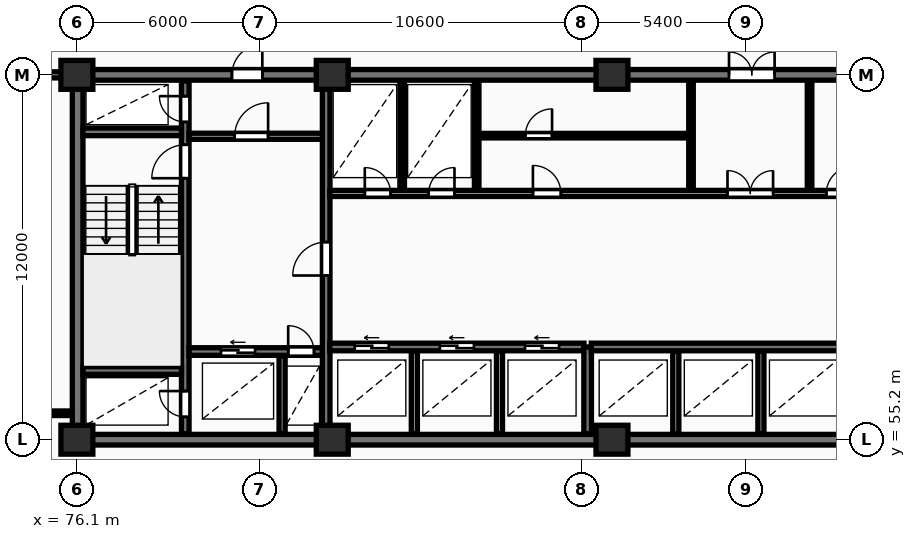
"""IFC4 building model, lengths in metres.
Left out: names, types, materials, properties, quantities, classifications, styles, units other than length and angle.
Written with IfcOpenShell. Run it as: python <this file> out.ifc"""

import sys

from ifc_helpers import new_model, si_unit, direction, frame, frame_2d, origin, origin_2d, place, context, subcontext, project, spatial, rectangle, extrude, element, fill, save


model = new_model("IFC4")
c1 = context("Model", 3, precision=1e-05, world=origin(), true_north=direction((0.0, 1.0)))
c2 = subcontext(c1, "Body", "Model", "MODEL_VIEW")
j1 = project(units=[si_unit("LENGTHUNIT", "METRE"), si_unit("PLANEANGLEUNIT", "RADIAN")], contexts=[c1])
p1 = place(None, origin())
s1 = spatial("IfcSite", under=j1, at=p1, CompositionType="ELEMENT")
p2 = place(p1, origin())
s2 = spatial("IfcBuilding", under=s1, at=p2, CompositionType="ELEMENT")
p3 = place(p2, frame((0.0, 0.0, 24.0)))
s3 = spatial("IfcBuildingStorey", under=s2, at=p3, CompositionType="ELEMENT", Elevation=24.0)
for number, where, z_axis, x_axis in (
    (1, (76.1, 55.2, 0.0), (0.0, 0.0, 1.0), (1.0, 0.0, 0.0)),
    (2, (76.1, 67.2, 0.0), (0.0, 0.0, 1.0), (1.0, 0.0, 0.0)),
    (3, (84.5, 55.2, 0.0), (0.0, 0.0, 1.0), (1.0, 0.0, 0.0)),
    (4, (84.5, 67.2, 0.0), (0.0, 0.0, 1.0), (1.0, 0.0, 0.0)),
    (5, (93.7, 55.2, 0.0), (0.0, 0.0, 1.0), (1.0, 0.0, 0.0)),
    (6, (93.7, 67.2, 0.0), (0.0, 0.0, 1.0), (1.0, 0.0, 0.0)),
):
    element("IfcColumn", number, at=place(p3, frame(where, z_axis=z_axis, x_axis=x_axis)), inside=s3, PredefinedType="COLUMN", context=c2, shape_type="SweptSolid", body=[
        extrude(rectangle(XDim=1.05, YDim=0.95, at=origin_2d()), origin(), (0.0, 0.0, 1.0), 3.25),
    ])
p4 = place(p3, frame((75.95, 55.2, 0.0), z_axis=(0.0, 0.0, 1.0), x_axis=(1.0, 0.0, 0.0)))
e7 = element("IfcWall", 7, at=p4, inside=s3, PredefinedType="SHEAR", context=c2, shape_type="SweptSolid", body=[
    extrude(rectangle(XDim=36.3, YDim=0.35, at=frame_2d((18.15, 0.0))), origin(), (0.0, 0.0, 1.0), 3.25),
])
p5 = place(p3, frame((76.125, 55.375, 0.0), z_axis=(0.0, 0.0, 1.0), x_axis=(0.0, 1.0, 0.0)))
e8 = element("IfcWall", 8, at=p5, inside=s3, PredefinedType="SHEAR", context=c2, shape_type="SweptSolid", body=[
    extrude(rectangle(XDim=11.65, YDim=0.35, at=frame_2d((5.825, 0.0))), origin(), (0.0, 0.0, 1.0), 3.25),
])
p6 = place(p3, frame((75.95, 67.2, 0.0), z_axis=(0.0, 0.0, 1.0), x_axis=(1.0, 0.0, 0.0)))
e9 = element("IfcWall", 9, at=p6, inside=s3, PredefinedType="SHEAR", context=c2, shape_type="SweptSolid", body=[
    extrude(rectangle(XDim=36.3, YDim=0.35, at=frame_2d((18.15, 0.0))), origin(), (0.0, 0.0, 1.0), 3.25),
])
p7 = place(p6, frame((5.25, 0.0, 0.0)))
e10 = element("IfcOpeningElement", 10, at=p7, cuts=e9, PredefinedType="OPENING", context=c2, shape_type="SweptSolid", body=[
    extrude(rectangle(XDim=1.0, YDim=2.15, at=frame_2d((0.5, 1.075))), frame((0.0, 0.185, 0.0), z_axis=(0.0, -1.0, 0.0), x_axis=(1.0, 0.0, 0.0)), (0.0, 0.0, 1.0), 0.37),
])
p8 = place(p6, frame((21.6, 0.0, 0.0)))
e11 = element("IfcOpeningElement", 11, at=p8, cuts=e9, PredefinedType="OPENING", context=c2, shape_type="SweptSolid", body=[
    extrude(rectangle(XDim=1.5, YDim=2.2, at=frame_2d((0.75, 1.1))), frame((0.0, 0.185, 0.0), z_axis=(0.0, -1.0, 0.0), x_axis=(1.0, 0.0, 0.0)), (0.0, 0.0, 1.0), 0.37),
])
p9 = place(p6, frame((30.45, 0.0, 0.0)))
e12 = element("IfcOpeningElement", 12, at=p9, cuts=e9, PredefinedType="OPENING", context=c2, shape_type="SweptSolid", body=[
    extrude(rectangle(XDim=1.0, YDim=2.15, at=frame_2d((0.5, 1.075))), frame((0.0, 0.185, 0.0), z_axis=(0.0, -1.0, 0.0), x_axis=(1.0, 0.0, 0.0)), (0.0, 0.0, 1.0), 0.37),
])
p10 = place(p3, frame((79.665, 55.4, 0.0), z_axis=(0.0, 0.0, 1.0), x_axis=(0.0, 1.0, 0.0)))
e13 = element("IfcWall", 13, at=p10, inside=s3, PredefinedType="SHEAR", context=c2, shape_type="SweptSolid", body=[
    extrude(rectangle(XDim=11.6, YDim=0.25, at=frame_2d((5.8, 0.0))), origin(), (0.0, 0.0, 1.0), 3.25),
])
p11 = place(p10, frame((0.55, 0.0, 0.0)))
e14 = element("IfcOpeningElement", 14, at=p11, cuts=e13, PredefinedType="OPENING", context=c2, shape_type="SweptSolid", body=[
    extrude(rectangle(XDim=0.85, YDim=2.05, at=frame_2d((0.425, 1.025))), frame((0.0, 0.135, 0.0), z_axis=(0.0, -1.0, 0.0), x_axis=(1.0, 0.0, 0.0)), (0.0, 0.0, 1.0), 0.27),
])
p12 = place(p10, frame((8.4, 0.0, 0.0)))
e15 = element("IfcOpeningElement", 15, at=p12, cuts=e13, PredefinedType="OPENING", context=c2, shape_type="SweptSolid", body=[
    extrude(rectangle(XDim=1.1, YDim=2.1, at=frame_2d((0.55, 1.05))), frame((0.0, 0.135, 0.0), z_axis=(0.0, -1.0, 0.0), x_axis=(1.0, 0.0, 0.0)), (0.0, 0.0, 1.0), 0.27),
])
p13 = place(p10, frame((10.25, 0.0, 0.0)))
e16 = element("IfcOpeningElement", 16, at=p13, cuts=e13, PredefinedType="OPENING", context=c2, shape_type="SweptSolid", body=[
    extrude(rectangle(XDim=0.85, YDim=2.05, at=frame_2d((0.425, 1.025))), frame((0.0, 0.135, 0.0), z_axis=(0.0, -1.0, 0.0), x_axis=(1.0, 0.0, 0.0)), (0.0, 0.0, 1.0), 0.27),
])
for number, where, z_axis, x_axis in (
    (17, (76.3, 57.475, 0.0), (0.0, 0.0, 1.0), (1.0, 0.0, 0.0)),
    (18, (76.3, 65.325, 0.0), (0.0, 0.0, 1.0), (1.0, 0.0, 0.0)),
):
    element("IfcWall", number, at=place(p3, frame(where, z_axis=z_axis, x_axis=x_axis)), inside=s3, PredefinedType="SHEAR", context=c2, shape_type="SweptSolid", body=[
        extrude(rectangle(XDim=3.24, YDim=0.25, at=frame_2d((1.62, 0.0))), origin(), (0.0, 0.0, 1.0), 3.25),
    ])
p14 = place(p3, frame((79.79, 58.1, 0.0), z_axis=(0.0, 0.0, 1.0), x_axis=(1.0, 0.0, 0.0)))
e19 = element("IfcWall", 19, at=p14, inside=s3, PredefinedType="SHEAR", context=c2, shape_type="SweptSolid", body=[
    extrude(rectangle(XDim=4.39, YDim=0.25, at=frame_2d((2.195, 0.0))), origin(), (0.0, 0.0, 1.0), 3.25),
])
p15 = place(p14, frame((1.05, 0.0, 0.0)))
e20 = element("IfcOpeningElement", 20, at=p15, cuts=e19, PredefinedType="OPENING", context=c2, shape_type="SweptSolid", body=[
    extrude(rectangle(XDim=1.12, YDim=2.12, at=frame_2d((0.56, 1.06))), frame((0.0, 0.135, 0.0), z_axis=(0.0, -1.0, 0.0), x_axis=(1.0, 0.0, 0.0)), (0.0, 0.0, 1.0), 0.27),
])
p16 = place(p14, frame((3.26, 0.0, 0.0)))
e21 = element("IfcOpeningElement", 21, at=p16, cuts=e19, PredefinedType="OPENING", context=c2, shape_type="SweptSolid", body=[
    extrude(rectangle(XDim=0.85, YDim=2.05, at=frame_2d((0.425, 1.025))), frame((0.0, 0.135, 0.0), z_axis=(0.0, -1.0, 0.0), x_axis=(1.0, 0.0, 0.0)), (0.0, 0.0, 1.0), 0.27),
])
p17 = place(p3, frame((82.85, 55.4, 0.0), z_axis=(0.0, 0.0, 1.0), x_axis=(0.0, 1.0, 0.0)))
e22 = element("IfcWall", 22, at=p17, inside=s3, PredefinedType="PARTITIONING", context=c2, shape_type="SweptSolid", body=[
    extrude(rectangle(XDim=2.56, YDim=0.2, at=frame_2d((1.28, 0.0))), origin(), (0.0, 0.0, 1.0), 2.97),
])
p18 = place(p3, frame((79.79, 65.18, 0.0), z_axis=(0.0, 0.0, 1.0), x_axis=(1.0, 0.0, 0.0)))
e23 = element("IfcWall", 23, at=p18, inside=s3, PredefinedType="PARTITIONING", context=c2, shape_type="SweptSolid", body=[
    extrude(rectangle(XDim=4.39, YDim=0.2, at=frame_2d((2.195, 0.0))), origin(), (0.0, 0.0, 1.0), 2.97),
])
p19 = place(p18, frame((1.5, 0.0, 0.0)))
e24 = element("IfcOpeningElement", 24, at=p19, cuts=e23, PredefinedType="OPENING", context=c2, shape_type="SweptSolid", body=[
    extrude(rectangle(XDim=1.1, YDim=2.1, at=frame_2d((0.55, 1.05))), frame((0.0, 0.11, 0.0), z_axis=(0.0, -1.0, 0.0), x_axis=(1.0, 0.0, 0.0)), (0.0, 0.0, 1.0), 0.22),
])
p20 = place(p3, frame((84.3, 55.4, 0.0), z_axis=(0.0, 0.0, 1.0), x_axis=(0.0, 1.0, 0.0)))
e25 = element("IfcWall", 25, at=p20, inside=s3, PredefinedType="SHEAR", context=c2, shape_type="SweptSolid", body=[
    extrude(rectangle(XDim=11.6, YDim=0.25, at=frame_2d((5.8, 0.0))), origin(), (0.0, 0.0, 1.0), 3.25),
])
p21 = place(p20, frame((5.2, 0.0, 0.0)))
e26 = element("IfcOpeningElement", 26, at=p21, cuts=e25, PredefinedType="OPENING", context=c2, shape_type="SweptSolid", body=[
    extrude(rectangle(XDim=1.1, YDim=2.1, at=frame_2d((0.55, 1.05))), frame((0.0, 0.135, 0.0), z_axis=(0.0, -1.0, 0.0), x_axis=(1.0, 0.0, 0.0)), (0.0, 0.0, 1.0), 0.27),
])
for number, where, z_axis, x_axis in (
    (27, (87.2, 55.4, 0.0), (0.0, 0.0, 1.0), (0.0, 1.0, 0.0)),
    (28, (90.0, 55.4, 0.0), (0.0, 0.0, 1.0), (0.0, 1.0, 0.0)),
):
    element("IfcWall", number, at=place(p3, frame(where, z_axis=z_axis, x_axis=x_axis)), inside=s3, PredefinedType="PARTITIONING", context=c2, shape_type="SweptSolid", body=[
        extrude(rectangle(XDim=2.72, YDim=0.2, at=frame_2d((1.36, 0.0))), origin(), (0.0, 0.0, 1.0), 2.97),
    ])
p22 = place(p3, frame((84.42, 58.25, 0.0), z_axis=(0.0, 0.0, 1.0), x_axis=(1.0, 0.0, 0.0)))
e29 = element("IfcWall", 29, at=p22, inside=s3, PredefinedType="SHEAR", context=c2, shape_type="SweptSolid", body=[
    extrude(rectangle(XDim=8.36, YDim=0.25, at=frame_2d((4.18, 0.0))), origin(), (0.0, 0.0, 1.0), 3.25),
])
p23 = place(p22, frame((0.82, 0.0, 0.0)))
e30 = element("IfcOpeningElement", 30, at=p23, cuts=e29, PredefinedType="OPENING", context=c2, shape_type="SweptSolid", body=[
    extrude(rectangle(XDim=1.12, YDim=2.12, at=frame_2d((0.56, 1.06))), frame((0.0, 0.135, 0.0), z_axis=(0.0, -1.0, 0.0), x_axis=(1.0, 0.0, 0.0)), (0.0, 0.0, 1.0), 0.27),
])
p24 = place(p22, frame((3.62, 0.0, 0.0)))
e31 = element("IfcOpeningElement", 31, at=p24, cuts=e29, PredefinedType="OPENING", context=c2, shape_type="SweptSolid", body=[
    extrude(rectangle(XDim=1.12, YDim=2.12, at=frame_2d((0.56, 1.06))), frame((0.0, 0.135, 0.0), z_axis=(0.0, -1.0, 0.0), x_axis=(1.0, 0.0, 0.0)), (0.0, 0.0, 1.0), 0.27),
])
p25 = place(p22, frame((6.42, 0.0, 0.0)))
e32 = element("IfcOpeningElement", 32, at=p25, cuts=e29, PredefinedType="OPENING", context=c2, shape_type="SweptSolid", body=[
    extrude(rectangle(XDim=1.12, YDim=2.12, at=frame_2d((0.56, 1.06))), frame((0.0, 0.135, 0.0), z_axis=(0.0, -1.0, 0.0), x_axis=(1.0, 0.0, 0.0)), (0.0, 0.0, 1.0), 0.27),
])
p26 = place(p3, frame((92.9, 55.4, 0.0), z_axis=(0.0, 0.0, 1.0), x_axis=(0.0, 1.0, 0.0)))
e33 = element("IfcWall", 33, at=p26, inside=s3, PredefinedType="SHEAR", context=c2, shape_type="SweptSolid", body=[
    extrude(rectangle(XDim=2.85, YDim=0.25, at=frame_2d((1.425, 0.0))), origin(), (0.0, 0.0, 1.0), 3.25),
])
for number, where, z_axis, x_axis in (
    (34, (95.8, 55.4, 0.0), (0.0, 0.0, 1.0), (0.0, 1.0, 0.0)),
    (35, (98.6, 55.4, 0.0), (0.0, 0.0, 1.0), (0.0, 1.0, 0.0)),
):
    element("IfcWall", number, at=place(p3, frame(where, z_axis=z_axis, x_axis=x_axis)), inside=s3, PredefinedType="PARTITIONING", context=c2, shape_type="SweptSolid", body=[
        extrude(rectangle(XDim=2.72, YDim=0.2, at=frame_2d((1.36, 0.0))), origin(), (0.0, 0.0, 1.0), 2.97),
    ])
p27 = place(p3, frame((93.02, 58.25, 0.0), z_axis=(0.0, 0.0, 1.0), x_axis=(1.0, 0.0, 0.0)))
e36 = element("IfcWall", 36, at=p27, inside=s3, PredefinedType="SHEAR", context=c2, shape_type="SweptSolid", body=[
    extrude(rectangle(XDim=8.36, YDim=0.25, at=frame_2d((4.18, 0.0))), origin(), (0.0, 0.0, 1.0), 3.25),
])
for number, where, z_axis, x_axis in (
    (37, (86.8, 63.4, 0.0), (0.0, 0.0, 1.0), (0.0, 1.0, 0.0)),
    (38, (89.25, 63.4, 0.0), (0.0, 0.0, 1.0), (0.0, 1.0, 0.0)),
):
    element("IfcWall", number, at=place(p3, frame(where, z_axis=z_axis, x_axis=x_axis)), inside=s3, PredefinedType="PARTITIONING", context=c2, shape_type="SweptSolid", body=[
        extrude(rectangle(XDim=3.6, YDim=0.15, at=frame_2d((1.8, 0.0))), origin(), (0.0, 0.0, 1.0), 2.97),
    ])
p28 = place(p3, frame((89.25, 65.2, 0.0), z_axis=(0.0, 0.0, 1.0), x_axis=(1.0, 0.0, 0.0)))
e39 = element("IfcWall", 39, at=p28, inside=s3, PredefinedType="PARTITIONING", context=c2, shape_type="SweptSolid", body=[
    extrude(rectangle(XDim=7.05, YDim=0.15, at=frame_2d((3.525, 0.0))), origin(), (0.0, 0.0, 1.0), 2.97),
])
p29 = place(p28, frame((1.6, 0.0, 0.0)))
e40 = element("IfcOpeningElement", 40, at=p29, cuts=e39, PredefinedType="OPENING", context=c2, shape_type="SweptSolid", body=[
    extrude(rectangle(XDim=0.88, YDim=2.06, at=frame_2d((0.44, 1.03))), frame((0.0, 0.085, 0.0), z_axis=(0.0, -1.0, 0.0), x_axis=(1.0, 0.0, 0.0)), (0.0, 0.0, 1.0), 0.17),
])
for number, where, z_axis, x_axis in (
    (41, (96.3, 63.4, 0.0), (0.0, 0.0, 1.0), (0.0, 1.0, 0.0)),
    (42, (100.2, 63.4, 0.0), (0.0, 0.0, 1.0), (0.0, 1.0, 0.0)),
):
    element("IfcWall", number, at=place(p3, frame(where, z_axis=z_axis, x_axis=x_axis)), inside=s3, PredefinedType="PARTITIONING", context=c2, shape_type="SweptSolid", body=[
        extrude(rectangle(XDim=3.6, YDim=0.15, at=frame_2d((1.8, 0.0))), origin(), (0.0, 0.0, 1.0), 2.97),
    ])
p30 = place(p3, frame((84.42, 63.3, 0.0), z_axis=(0.0, 0.0, 1.0), x_axis=(1.0, 0.0, 0.0)))
e43 = element("IfcWall", 43, at=p30, inside=s3, PredefinedType="PARTITIONING", context=c2, shape_type="SweptSolid", body=[
    extrude(rectangle(XDim=19.83, YDim=0.2, at=frame_2d((9.915, 0.0))), origin(), (0.0, 0.0, 1.0), 2.97),
])
p31 = place(p30, frame((1.15, 0.0, 0.0)))
e44 = element("IfcOpeningElement", 44, at=p31, cuts=e43, PredefinedType="OPENING", context=c2, shape_type="SweptSolid", body=[
    extrude(rectangle(XDim=0.85, YDim=2.05, at=frame_2d((0.425, 1.025))), frame((0.0, 0.11, 0.0), z_axis=(0.0, -1.0, 0.0), x_axis=(1.0, 0.0, 0.0)), (0.0, 0.0, 1.0), 0.22),
])
p32 = place(p30, frame((3.25, 0.0, 0.0)))
e45 = element("IfcOpeningElement", 45, at=p32, cuts=e43, PredefinedType="OPENING", context=c2, shape_type="SweptSolid", body=[
    extrude(rectangle(XDim=0.85, YDim=2.05, at=frame_2d((0.425, 1.025))), frame((0.0, 0.11, 0.0), z_axis=(0.0, -1.0, 0.0), x_axis=(1.0, 0.0, 0.0)), (0.0, 0.0, 1.0), 0.22),
])
p33 = place(p30, frame((13.08, 0.0, 0.0)))
e46 = element("IfcOpeningElement", 46, at=p33, cuts=e43, PredefinedType="OPENING", context=c2, shape_type="SweptSolid", body=[
    extrude(rectangle(XDim=1.5, YDim=2.2, at=frame_2d((0.75, 1.1))), frame((0.0, 0.11, 0.0), z_axis=(0.0, -1.0, 0.0), x_axis=(1.0, 0.0, 0.0)), (0.0, 0.0, 1.0), 0.22),
])
p34 = place(p30, frame((6.68, 0.0, 0.0)))
e47 = element("IfcOpeningElement", 47, at=p34, cuts=e43, PredefinedType="OPENING", context=c2, shape_type="SweptSolid", body=[
    extrude(rectangle(XDim=0.92, YDim=2.08, at=frame_2d((0.46, 1.04))), frame((0.0, 0.11, 0.0), z_axis=(0.0, -1.0, 0.0), x_axis=(1.0, 0.0, 0.0)), (0.0, 0.0, 1.0), 0.22),
])
p35 = place(p30, frame((16.33, 0.0, 0.0)))
e48 = element("IfcOpeningElement", 48, at=p35, cuts=e43, PredefinedType="OPENING", context=c2, shape_type="SweptSolid", body=[
    extrude(rectangle(XDim=0.88, YDim=2.06, at=frame_2d((0.44, 1.03))), frame((0.0, 0.11, 0.0), z_axis=(0.0, -1.0, 0.0), x_axis=(1.0, 0.0, 0.0)), (0.0, 0.0, 1.0), 0.22),
])
p36 = place(p3, frame((69.17, 56.07, 0.0), z_axis=(0.0, 0.0, 1.0), x_axis=(1.0, 0.0, 0.0)))
e49 = element("IfcWall", 49, at=p36, inside=s3, PredefinedType="PARTITIONING", context=c2, shape_type="SweptSolid", body=[
    extrude(rectangle(XDim=6.76, YDim=0.15, at=frame_2d((3.38, 0.0))), origin(), (0.0, 0.0, 1.0), 2.97),
])
p37 = place(p36, frame((1.362, 0.0, 0.0)))
e50 = element("IfcOpeningElement", 50, at=p37, cuts=e49, PredefinedType="OPENING", context=c2, shape_type="SweptSolid", body=[
    extrude(rectangle(XDim=0.84, YDim=2.04, at=frame_2d((0.42, 1.02))), frame((0.0, 0.085, 0.0), z_axis=(0.0, -1.0, 0.0), x_axis=(1.0, 0.0, 0.0)), (0.0, 0.0, 1.0), 0.17),
])
p38 = place(p36, frame((4.277, 0.0, 0.0)))
e51 = element("IfcOpeningElement", 51, at=p38, cuts=e49, PredefinedType="OPENING", context=c2, shape_type="SweptSolid", body=[
    extrude(rectangle(XDim=0.88, YDim=2.06, at=frame_2d((0.44, 1.03))), frame((0.0, 0.085, 0.0), z_axis=(0.0, -1.0, 0.0), x_axis=(1.0, 0.0, 0.0)), (0.0, 0.0, 1.0), 0.17),
])
p39 = place(p3, frame((55.3, 67.2, 0.0), z_axis=(0.0, 0.0, 1.0), x_axis=(1.0, 0.0, 0.0)))
e52 = element("IfcWall", 52, at=p39, inside=s3, PredefinedType="PARTITIONING", context=c2, shape_type="SweptSolid", body=[
    extrude(rectangle(XDim=20.65, YDim=0.2, at=frame_2d((10.325, 0.0))), origin(), (0.0, 0.0, 1.0), 2.37),
])
p40 = place(p39, frame((14.426, 0.0, 0.0)))
e53 = element("IfcOpeningElement", 53, at=p40, cuts=e52, PredefinedType="OPENING", context=c2, shape_type="SweptSolid", body=[
    extrude(rectangle(XDim=0.95, YDim=2.15, at=frame_2d((0.475, 1.075))), frame((0.0, 0.11, 0.0), z_axis=(0.0, -1.0, 0.0), x_axis=(1.0, 0.0, 0.0)), (0.0, 0.0, 1.0), 0.22),
])
p41 = place(p7, origin())
e54 = element("IfcDoor", 54, at=p41, inside=s3, OperationType="SINGLE_SWING_RIGHT", PredefinedType="DOOR", context=c2, shape_type="SweptSolid", body=[
    extrude(rectangle(XDim=1.0, YDim=2.15, at=frame_2d((0.5, 1.075))), frame((0.0, 0.025, 0.0), z_axis=(0.0, -1.0, 0.0), x_axis=(1.0, 0.0, 0.0)), (0.0, 0.0, 1.0), 0.05),
])
fill(e10, e54)
p42 = place(p8, origin())
e55 = element("IfcDoor", 55, at=p42, inside=s3, OperationType="DOUBLE_DOOR_SINGLE_SWING", PredefinedType="DOOR", context=c2, shape_type="SweptSolid", body=[
    extrude(rectangle(XDim=1.5, YDim=2.2, at=frame_2d((0.75, 1.1))), frame((0.0, 0.025, 0.0), z_axis=(0.0, -1.0, 0.0), x_axis=(1.0, 0.0, 0.0)), (0.0, 0.0, 1.0), 0.05),
])
fill(e11, e55)
p43 = place(p11, origin())
e56 = element("IfcDoor", 56, at=p43, inside=s3, OperationType="SINGLE_SWING_RIGHT", PredefinedType="DOOR", context=c2, shape_type="SweptSolid", body=[
    extrude(rectangle(XDim=0.85, YDim=2.05, at=frame_2d((0.425, 1.025))), frame((0.0, 0.025, 0.0), z_axis=(0.0, -1.0, 0.0), x_axis=(1.0, 0.0, 0.0)), (0.0, 0.0, 1.0), 0.05),
])
fill(e14, e56)
p44 = place(p12, origin())
e57 = element("IfcDoor", 57, at=p44, inside=s3, OperationType="SINGLE_SWING_LEFT", PredefinedType="DOOR", context=c2, shape_type="SweptSolid", body=[
    extrude(rectangle(XDim=1.1, YDim=2.1, at=frame_2d((0.55, 1.05))), frame((0.0, 0.025, 0.0), z_axis=(0.0, -1.0, 0.0), x_axis=(1.0, 0.0, 0.0)), (0.0, 0.0, 1.0), 0.05),
])
fill(e15, e57)
p45 = place(p13, origin())
e58 = element("IfcDoor", 58, at=p45, inside=s3, OperationType="SINGLE_SWING_RIGHT", PredefinedType="DOOR", context=c2, shape_type="SweptSolid", body=[
    extrude(rectangle(XDim=0.85, YDim=2.05, at=frame_2d((0.425, 1.025))), frame((0.0, 0.025, 0.0), z_axis=(0.0, -1.0, 0.0), x_axis=(1.0, 0.0, 0.0)), (0.0, 0.0, 1.0), 0.05),
])
fill(e16, e58)
p46 = place(p15, origin())
e59 = element("IfcDoor", 59, at=p46, inside=s3, OperationType="SLIDING_TO_LEFT", PredefinedType="DOOR", context=c2, shape_type="SweptSolid", body=[
    extrude(rectangle(XDim=1.12, YDim=2.12, at=frame_2d((0.56, 1.06))), frame((0.0, 0.025, 0.0), z_axis=(0.0, -1.0, 0.0), x_axis=(1.0, 0.0, 0.0)), (0.0, 0.0, 1.0), 0.05),
])
fill(e20, e59)
p47 = place(p16, origin())
e60 = element("IfcDoor", 60, at=p47, inside=s3, OperationType="SINGLE_SWING_LEFT", PredefinedType="DOOR", context=c2, shape_type="SweptSolid", body=[
    extrude(rectangle(XDim=0.85, YDim=2.05, at=frame_2d((0.425, 1.025))), frame((0.0, 0.025, 0.0), z_axis=(0.0, -1.0, 0.0), x_axis=(1.0, 0.0, 0.0)), (0.0, 0.0, 1.0), 0.05),
])
fill(e21, e60)
p48 = place(p19, origin())
e61 = element("IfcDoor", 61, at=p48, inside=s3, OperationType="SINGLE_SWING_RIGHT", PredefinedType="DOOR", context=c2, shape_type="SweptSolid", body=[
    extrude(rectangle(XDim=1.1, YDim=2.1, at=frame_2d((0.55, 1.05))), frame((0.0, 0.025, 0.0), z_axis=(0.0, -1.0, 0.0), x_axis=(1.0, 0.0, 0.0)), (0.0, 0.0, 1.0), 0.05),
])
fill(e24, e61)
p49 = place(p21, origin())
e62 = element("IfcDoor", 62, at=p49, inside=s3, OperationType="SINGLE_SWING_LEFT", PredefinedType="DOOR", context=c2, shape_type="SweptSolid", body=[
    extrude(rectangle(XDim=1.1, YDim=2.1, at=frame_2d((0.55, 1.05))), frame((0.0, 0.025, 0.0), z_axis=(0.0, -1.0, 0.0), x_axis=(1.0, 0.0, 0.0)), (0.0, 0.0, 1.0), 0.05),
])
fill(e26, e62)
p50 = place(p23, origin())
e63 = element("IfcDoor", 63, at=p50, inside=s3, OperationType="SLIDING_TO_LEFT", PredefinedType="DOOR", context=c2, shape_type="SweptSolid", body=[
    extrude(rectangle(XDim=1.12, YDim=2.12, at=frame_2d((0.56, 1.06))), frame((0.0, 0.025, 0.0), z_axis=(0.0, -1.0, 0.0), x_axis=(1.0, 0.0, 0.0)), (0.0, 0.0, 1.0), 0.05),
])
fill(e30, e63)
p51 = place(p24, origin())
e64 = element("IfcDoor", 64, at=p51, inside=s3, OperationType="SLIDING_TO_LEFT", PredefinedType="DOOR", context=c2, shape_type="SweptSolid", body=[
    extrude(rectangle(XDim=1.12, YDim=2.12, at=frame_2d((0.56, 1.06))), frame((0.0, 0.025, 0.0), z_axis=(0.0, -1.0, 0.0), x_axis=(1.0, 0.0, 0.0)), (0.0, 0.0, 1.0), 0.05),
])
fill(e31, e64)
p52 = place(p25, origin())
e65 = element("IfcDoor", 65, at=p52, inside=s3, OperationType="SLIDING_TO_LEFT", PredefinedType="DOOR", context=c2, shape_type="SweptSolid", body=[
    extrude(rectangle(XDim=1.12, YDim=2.12, at=frame_2d((0.56, 1.06))), frame((0.0, 0.025, 0.0), z_axis=(0.0, -1.0, 0.0), x_axis=(1.0, 0.0, 0.0)), (0.0, 0.0, 1.0), 0.05),
])
fill(e32, e65)
p53 = place(p29, origin())
e66 = element("IfcDoor", 66, at=p53, inside=s3, OperationType="SINGLE_SWING_RIGHT", PredefinedType="DOOR", context=c2, shape_type="SweptSolid", body=[
    extrude(rectangle(XDim=0.88, YDim=2.06, at=frame_2d((0.44, 1.03))), frame((0.0, 0.025, 0.0), z_axis=(0.0, -1.0, 0.0), x_axis=(1.0, 0.0, 0.0)), (0.0, 0.0, 1.0), 0.05),
])
fill(e40, e66)
p54 = place(p31, origin())
e67 = element("IfcDoor", 67, at=p54, inside=s3, OperationType="SINGLE_SWING_LEFT", PredefinedType="DOOR", context=c2, shape_type="SweptSolid", body=[
    extrude(rectangle(XDim=0.85, YDim=2.05, at=frame_2d((0.425, 1.025))), frame((0.0, 0.025, 0.0), z_axis=(0.0, -1.0, 0.0), x_axis=(1.0, 0.0, 0.0)), (0.0, 0.0, 1.0), 0.05),
])
fill(e44, e67)
p55 = place(p32, origin())
e68 = element("IfcDoor", 68, at=p55, inside=s3, OperationType="SINGLE_SWING_RIGHT", PredefinedType="DOOR", context=c2, shape_type="SweptSolid", body=[
    extrude(rectangle(XDim=0.85, YDim=2.05, at=frame_2d((0.425, 1.025))), frame((0.0, 0.025, 0.0), z_axis=(0.0, -1.0, 0.0), x_axis=(1.0, 0.0, 0.0)), (0.0, 0.0, 1.0), 0.05),
])
fill(e45, e68)
p56 = place(p33, origin())
e69 = element("IfcDoor", 69, at=p56, inside=s3, OperationType="DOUBLE_DOOR_SINGLE_SWING", PredefinedType="DOOR", context=c2, shape_type="SweptSolid", body=[
    extrude(rectangle(XDim=1.5, YDim=2.2, at=frame_2d((0.75, 1.1))), frame((0.0, 0.025, 0.0), z_axis=(0.0, -1.0, 0.0), x_axis=(1.0, 0.0, 0.0)), (0.0, 0.0, 1.0), 0.05),
])
fill(e46, e69)
p57 = place(p34, origin())
e70 = element("IfcDoor", 70, at=p57, inside=s3, OperationType="SINGLE_SWING_LEFT", PredefinedType="DOOR", context=c2, shape_type="SweptSolid", body=[
    extrude(rectangle(XDim=0.92, YDim=2.08, at=frame_2d((0.46, 1.04))), frame((0.0, 0.025, 0.0), z_axis=(0.0, -1.0, 0.0), x_axis=(1.0, 0.0, 0.0)), (0.0, 0.0, 1.0), 0.05),
])
fill(e47, e70)
p58 = place(p35, origin())
e71 = element("IfcDoor", 71, at=p58, inside=s3, OperationType="SINGLE_SWING_RIGHT", PredefinedType="DOOR", context=c2, shape_type="SweptSolid", body=[
    extrude(rectangle(XDim=0.88, YDim=2.06, at=frame_2d((0.44, 1.03))), frame((0.0, 0.025, 0.0), z_axis=(0.0, -1.0, 0.0), x_axis=(1.0, 0.0, 0.0)), (0.0, 0.0, 1.0), 0.05),
])
fill(e48, e71)
save(model, sys.argv[1])
